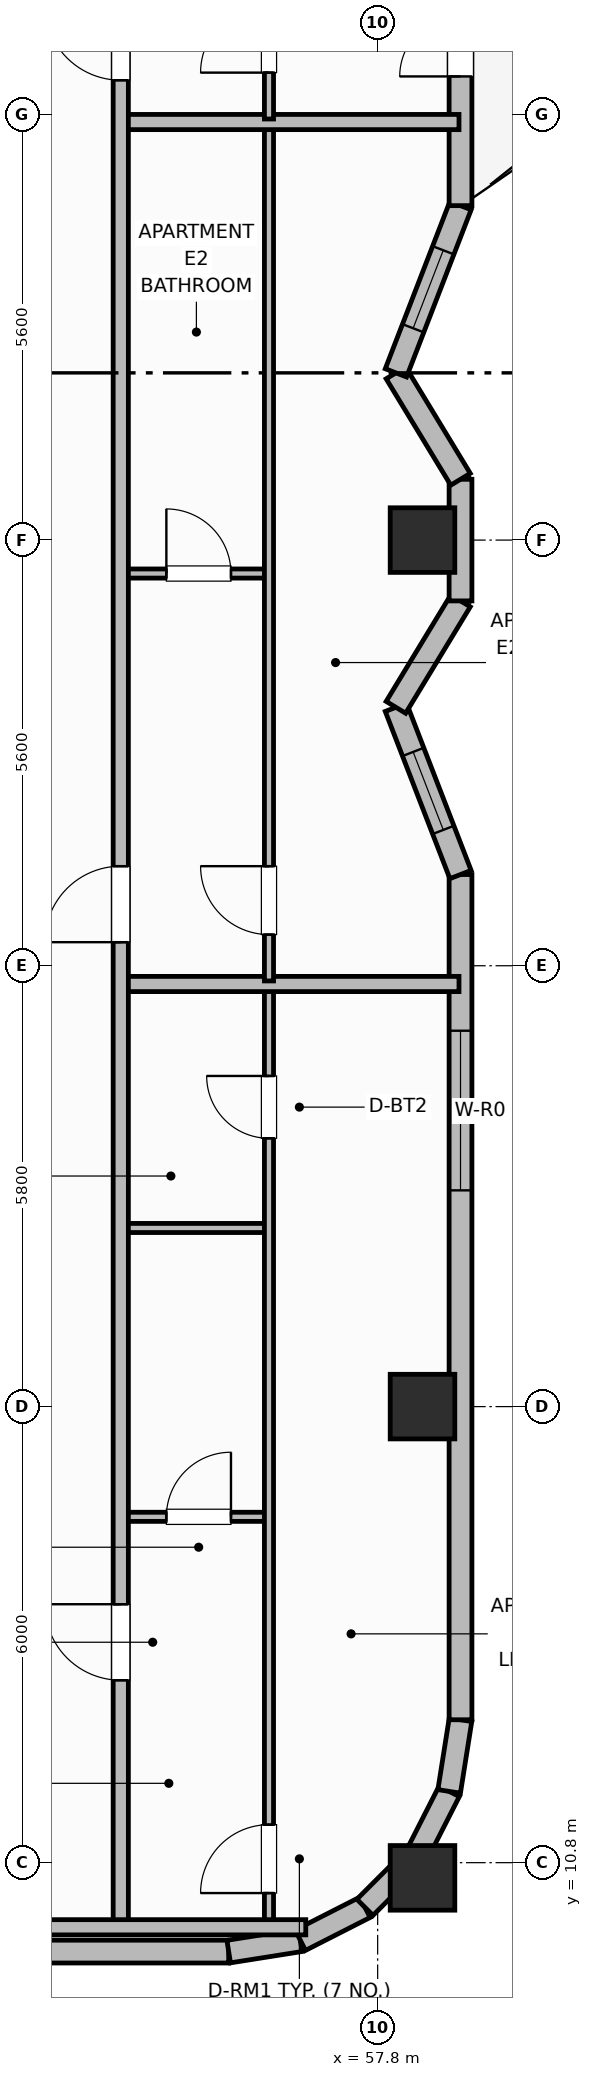
"""IFC4 building model, lengths in metres.
Left out: names, types, materials, properties, quantities, classifications, styles, units other than length and angle.
Written with IfcOpenShell. Run it as: python <this file> out.ifc"""

import sys

from ifc_helpers import new_model, si_unit, direction, frame, frame_2d, origin, origin_2d, place, context, subcontext, project, spatial, rectangle, extrude, element, fill, save


model = new_model("IFC4")
c1 = context("Model", 3, precision=1e-05, world=origin(), true_north=direction((0.0, 1.0)))
c2 = subcontext(c1, "Body", "Model", "MODEL_VIEW")
j1 = project(units=[si_unit("LENGTHUNIT", "METRE"), si_unit("PLANEANGLEUNIT", "RADIAN")], contexts=[c1])
p1 = place(None, origin())
s1 = spatial("IfcSite", under=j1, at=p1, CompositionType="ELEMENT")
p2 = place(p1, origin())
s2 = spatial("IfcBuilding", under=s1, at=p2, CompositionType="ELEMENT")
p3 = place(p2, frame((0.0, 0.0, 233.2)))
s3 = spatial("IfcBuildingStorey", under=s2, at=p3, CompositionType="ELEMENT", Elevation=233.2)
for number, where, z_axis, x_axis in (
    (1, (58.39, 10.6, 0.0), (0.0, 0.0, 1.0), (1.0, 0.0, 0.0)),
    (2, (58.39, 16.8, 0.0), (0.0, 0.0, 1.0), (1.0, 0.0, 0.0)),
    (3, (58.39, 28.2, 0.0), (0.0, 0.0, 1.0), (1.0, 0.0, 0.0)),
):
    element("IfcColumn", number, at=place(p3, frame(where, z_axis=z_axis, x_axis=x_axis)), inside=s3, PredefinedType="COLUMN", context=c2, shape_type="SweptSolid", body=[
        extrude(rectangle(XDim=0.85, YDim=0.85, at=origin_2d()), origin(), (0.0, 0.0, 1.0), 3.7),
    ])
p4 = place(p3, frame((22.56, 9.63, 0.0), z_axis=(0.0, 0.0, 1.0), x_axis=(1.0, 0.0, 0.0)))
e4 = element("IfcWall", 4, at=p4, inside=s3, PredefinedType="SOLIDWALL", context=c2, shape_type="SweptSolid", body=[
    extrude(rectangle(XDim=33.28, YDim=0.3, at=frame_2d((16.64, 0.0))), origin(), (0.0, 0.0, 1.0), 2.73),
])
p5 = place(p4, frame((4.461, 0.0, 0.95)))
e5 = element("IfcOpeningElement", 5, at=p5, cuts=e4, PredefinedType="OPENING", context=c2, shape_type="SweptSolid", body=[
    extrude(rectangle(XDim=1.1, YDim=1.65, at=frame_2d((0.55, 0.825))), frame((0.0, 0.16, 0.0), z_axis=(0.0, -1.0, 0.0), x_axis=(1.0, 0.0, 0.0)), (0.0, 0.0, 1.0), 0.32),
])
p6 = place(p4, frame((7.368, 0.0, 0.95)))
e6 = element("IfcOpeningElement", 6, at=p6, cuts=e4, PredefinedType="OPENING", context=c2, shape_type="SweptSolid", body=[
    extrude(rectangle(XDim=1.1, YDim=1.65, at=frame_2d((0.55, 0.825))), frame((0.0, 0.16, 0.0), z_axis=(0.0, -1.0, 0.0), x_axis=(1.0, 0.0, 0.0)), (0.0, 0.0, 1.0), 0.32),
])
p7 = place(p4, frame((10.275, 0.0, 0.95)))
e7 = element("IfcOpeningElement", 7, at=p7, cuts=e4, PredefinedType="OPENING", context=c2, shape_type="SweptSolid", body=[
    extrude(rectangle(XDim=1.1, YDim=1.65, at=frame_2d((0.55, 0.825))), frame((0.0, 0.16, 0.0), z_axis=(0.0, -1.0, 0.0), x_axis=(1.0, 0.0, 0.0)), (0.0, 0.0, 1.0), 0.32),
])
p8 = place(p4, frame((13.883, 0.0, 0.95)))
e8 = element("IfcOpeningElement", 8, at=p8, cuts=e4, PredefinedType="OPENING", context=c2, shape_type="SweptSolid", body=[
    extrude(rectangle(XDim=1.1, YDim=1.65, at=frame_2d((0.55, 0.825))), frame((0.0, 0.16, 0.0), z_axis=(0.0, -1.0, 0.0), x_axis=(1.0, 0.0, 0.0)), (0.0, 0.0, 1.0), 0.32),
])
p9 = place(p4, frame((16.09, 0.0, 0.95)))
e9 = element("IfcOpeningElement", 9, at=p9, cuts=e4, PredefinedType="OPENING", context=c2, shape_type="SweptSolid", body=[
    extrude(rectangle(XDim=1.1, YDim=1.65, at=frame_2d((0.55, 0.825))), frame((0.0, 0.16, 0.0), z_axis=(0.0, -1.0, 0.0), x_axis=(1.0, 0.0, 0.0)), (0.0, 0.0, 1.0), 0.32),
])
p10 = place(p4, frame((18.297, 0.0, 0.95)))
e10 = element("IfcOpeningElement", 10, at=p10, cuts=e4, PredefinedType="OPENING", context=c2, shape_type="SweptSolid", body=[
    extrude(rectangle(XDim=1.1, YDim=1.65, at=frame_2d((0.55, 0.825))), frame((0.0, 0.16, 0.0), z_axis=(0.0, -1.0, 0.0), x_axis=(1.0, 0.0, 0.0)), (0.0, 0.0, 1.0), 0.32),
])
p11 = place(p4, frame((21.905, 0.0, 0.95)))
e11 = element("IfcOpeningElement", 11, at=p11, cuts=e4, PredefinedType="OPENING", context=c2, shape_type="SweptSolid", body=[
    extrude(rectangle(XDim=1.1, YDim=1.65, at=frame_2d((0.55, 0.825))), frame((0.0, 0.16, 0.0), z_axis=(0.0, -1.0, 0.0), x_axis=(1.0, 0.0, 0.0)), (0.0, 0.0, 1.0), 0.32),
])
p12 = place(p4, frame((24.812, 0.0, 0.95)))
e12 = element("IfcOpeningElement", 12, at=p12, cuts=e4, PredefinedType="OPENING", context=c2, shape_type="SweptSolid", body=[
    extrude(rectangle(XDim=1.1, YDim=1.65, at=frame_2d((0.55, 0.825))), frame((0.0, 0.16, 0.0), z_axis=(0.0, -1.0, 0.0), x_axis=(1.0, 0.0, 0.0)), (0.0, 0.0, 1.0), 0.32),
])
p13 = place(p4, frame((27.719, 0.0, 0.95)))
e13 = element("IfcOpeningElement", 13, at=p13, cuts=e4, PredefinedType="OPENING", context=c2, shape_type="SweptSolid", body=[
    extrude(rectangle(XDim=1.1, YDim=1.65, at=frame_2d((0.55, 0.825))), frame((0.0, 0.16, 0.0), z_axis=(0.0, -1.0, 0.0), x_axis=(1.0, 0.0, 0.0)), (0.0, 0.0, 1.0), 0.32),
])
p14 = place(p3, frame((55.84, 9.63, 0.0), z_axis=(0.0, 0.0, 1.0), x_axis=(0.987663181641, 0.156593229835, 0.0)))
e14 = element("IfcWall", 14, at=p14, inside=s3, PredefinedType="SOLIDWALL", context=c2, shape_type="SweptSolid", body=[
    extrude(rectangle(XDim=0.954, YDim=0.3, at=frame_2d((0.477, 0.0))), origin(), (0.0, 0.0, 1.0), 2.73),
])
for number, where, z_axis, x_axis in (
    (15, (56.782, 9.779, 0.0), (0.0, 0.0, 1.0), (0.891, 0.454, 0.0)),
    (16, (57.633, 10.212, 0.0), (0.0, 0.0, 1.0), (0.707, 0.707, 0.0)),
    (17, (58.308, 10.887, 0.0), (0.0, 0.0, 1.0), (0.454, 0.891, 0.0)),
):
    element("IfcWall", number, at=place(p3, frame(where, z_axis=z_axis, x_axis=x_axis)), inside=s3, PredefinedType="SOLIDWALL", context=c2, shape_type="SweptSolid", body=[
        extrude(rectangle(XDim=0.954, YDim=0.3, at=frame_2d((0.477, 0.0))), origin(), (0.0, 0.0, 1.0), 2.73),
    ])
p15 = place(p3, frame((58.741, 11.738, 0.0), z_axis=(0.0, 0.0, 1.0), x_axis=(0.156343617883, 0.987702725088, 0.0)))
e18 = element("IfcWall", 18, at=p15, inside=s3, PredefinedType="SOLIDWALL", context=c2, shape_type="SweptSolid", body=[
    extrude(rectangle(XDim=0.954, YDim=0.3, at=frame_2d((0.477, 0.0))), origin(), (0.0, 0.0, 1.0), 2.73),
])
p16 = place(p3, frame((58.89, 12.68, 0.0), z_axis=(0.0, 0.0, 1.0), x_axis=(0.0, 1.0, 0.0)))
e19 = element("IfcWall", 19, at=p16, inside=s3, PredefinedType="SOLIDWALL", context=c2, shape_type="SweptSolid", body=[
    extrude(rectangle(XDim=11.12, YDim=0.3, at=frame_2d((5.56, 0.0))), origin(), (0.0, 0.0, 1.0), 2.73),
])
p17 = place(p16, frame((6.965, 0.0, 0.71)))
e20 = element("IfcOpeningElement", 20, at=p17, cuts=e19, PredefinedType="OPENING", context=c2, shape_type="SweptSolid", body=[
    extrude(rectangle(XDim=2.1, YDim=1.9, at=frame_2d((1.05, 0.95))), frame((0.0, 0.16, 0.0), z_axis=(0.0, -1.0, 0.0), x_axis=(1.0, 0.0, 0.0)), (0.0, 0.0, 1.0), 0.32),
])
p18 = place(p3, frame((58.89, 23.8, 0.0), z_axis=(0.0, 0.0, 1.0), x_axis=(-0.360352194711, 0.932816324775, 0.0)))
e21 = element("IfcWall", 21, at=p18, inside=s3, PredefinedType="SOLIDWALL", context=c2, shape_type="SweptSolid", body=[
    extrude(rectangle(XDim=2.358, YDim=0.3, at=frame_2d((1.179, 0.0))), origin(), (0.0, 0.0, 1.0), 2.73),
])
p19 = place(p18, frame((0.629, 0.0, 0.92)))
e22 = element("IfcOpeningElement", 22, at=p19, cuts=e21, PredefinedType="OPENING", context=c2, shape_type="SweptSolid", body=[
    extrude(rectangle(XDim=1.1, YDim=1.65, at=frame_2d((0.55, 0.825))), frame((0.0, 0.16, 0.0), z_axis=(0.0, -1.0, 0.0), x_axis=(1.0, 0.0, 0.0)), (0.0, 0.0, 1.0), 0.32),
])
p20 = place(p3, frame((58.04, 26.0, 0.0), z_axis=(0.0, 0.0, 1.0), x_axis=(0.518939231806, 0.854811133346, 0.0)))
e23 = element("IfcWall", 23, at=p20, inside=s3, PredefinedType="SOLIDWALL", context=c2, shape_type="SweptSolid", body=[
    extrude(rectangle(XDim=1.638, YDim=0.3, at=frame_2d((0.819, 0.0))), origin(), (0.0, 0.0, 1.0), 2.73),
])
p21 = place(p3, frame((58.89, 27.4, 0.0), z_axis=(0.0, 0.0, 1.0), x_axis=(0.0, 1.0, 0.0)))
e24 = element("IfcWall", 24, at=p21, inside=s3, PredefinedType="SOLIDWALL", context=c2, shape_type="SweptSolid", body=[
    extrude(rectangle(XDim=1.6, YDim=0.3, at=frame_2d((0.8, 0.0))), origin(), (0.0, 0.0, 1.0), 2.73),
])
p22 = place(p3, frame((58.89, 29.0, 0.0), z_axis=(0.0, 0.0, 1.0), x_axis=(-0.518939231806, 0.854811133346, 0.0)))
e25 = element("IfcWall", 25, at=p22, inside=s3, PredefinedType="SOLIDWALL", context=c2, shape_type="SweptSolid", body=[
    extrude(rectangle(XDim=1.638, YDim=0.3, at=frame_2d((0.819, 0.0))), origin(), (0.0, 0.0, 1.0), 2.73),
])
p23 = place(p3, frame((58.04, 30.4, 0.0), z_axis=(0.0, 0.0, 1.0), x_axis=(0.360317400447, 0.932829765249, 0.0)))
e26 = element("IfcWall", 26, at=p23, inside=s3, PredefinedType="SOLIDWALL", context=c2, shape_type="SweptSolid", body=[
    extrude(rectangle(XDim=2.359, YDim=0.3, at=frame_2d((1.179, 0.0))), origin(), (0.0, 0.0, 1.0), 2.73),
])
p24 = place(p23, frame((0.629, 0.0, 0.92)))
e27 = element("IfcOpeningElement", 27, at=p24, cuts=e26, PredefinedType="OPENING", context=c2, shape_type="SweptSolid", body=[
    extrude(rectangle(XDim=1.1, YDim=1.65, at=frame_2d((0.55, 0.825))), frame((0.0, 0.16, 0.0), z_axis=(0.0, -1.0, 0.0), x_axis=(1.0, 0.0, 0.0)), (0.0, 0.0, 1.0), 0.32),
])
p25 = place(p3, frame((58.89, 32.6, 0.0), z_axis=(0.0, 0.0, 1.0), x_axis=(0.0, 1.0, 0.0)))
e28 = element("IfcWall", 28, at=p25, inside=s3, PredefinedType="SOLIDWALL", context=c2, shape_type="SweptSolid", body=[
    extrude(rectangle(XDim=11.12, YDim=0.3, at=frame_2d((5.56, 0.0))), origin(), (0.0, 0.0, 1.0), 2.73),
])
p26 = place(p25, frame((1.7, 0.0, 0.0)))
e29 = element("IfcOpeningElement", 29, at=p26, cuts=e28, PredefinedType="OPENING", context=c2, shape_type="SweptSolid", body=[
    extrude(rectangle(XDim=1.6, YDim=2.1, at=frame_2d((0.8, 1.05))), frame((0.0, 0.16, 0.0), z_axis=(0.0, -1.0, 0.0), x_axis=(1.0, 0.0, 0.0)), (0.0, 0.0, 1.0), 0.32),
])
p27 = place(p3, frame((54.42, 15.35, 0.0), z_axis=(0.0, 0.0, 1.0), x_axis=(1.0, 0.0, 0.0)))
e30 = element("IfcWall", 30, at=p27, inside=s3, PredefinedType="PARTITIONING", context=c2, shape_type="SweptSolid", body=[
    extrude(rectangle(XDim=1.95, YDim=0.12, at=frame_2d((0.975, 0.0))), origin(), (0.0, 0.0, 1.0), 2.56),
])
p28 = place(p27, frame((0.6, 0.0, 0.0)))
e31 = element("IfcOpeningElement", 31, at=p28, cuts=e30, PredefinedType="OPENING", context=c2, shape_type="SweptSolid", body=[
    extrude(rectangle(XDim=0.85, YDim=2.1, at=frame_2d((0.425, 1.05))), frame((0.0, 0.07, 0.0), z_axis=(0.0, -1.0, 0.0), x_axis=(1.0, 0.0, 0.0)), (0.0, 0.0, 1.0), 0.14),
])
p29 = place(p3, frame((54.42, 19.15, 0.0), z_axis=(0.0, 0.0, 1.0), x_axis=(1.0, 0.0, 0.0)))
e32 = element("IfcWall", 32, at=p29, inside=s3, PredefinedType="PARTITIONING", context=c2, shape_type="SweptSolid", body=[
    extrude(rectangle(XDim=1.95, YDim=0.12, at=frame_2d((0.975, 0.0))), origin(), (0.0, 0.0, 1.0), 2.56),
])
p30 = place(p3, frame((56.37, 9.99, 0.0), z_axis=(0.0, 0.0, 1.0), x_axis=(0.0, 1.0, 0.0)))
e33 = element("IfcWall", 33, at=p30, inside=s3, PredefinedType="PARTITIONING", context=c2, shape_type="SweptSolid", body=[
    extrude(rectangle(XDim=12.33, YDim=0.12, at=frame_2d((6.165, 0.0))), origin(), (0.0, 0.0, 1.0), 2.56),
])
p31 = place(p30, frame((0.41, 0.0, 0.0)))
e34 = element("IfcOpeningElement", 34, at=p31, cuts=e33, PredefinedType="OPENING", context=c2, shape_type="SweptSolid", body=[
    extrude(rectangle(XDim=0.9, YDim=2.1, at=frame_2d((0.45, 1.05))), frame((0.0, 0.07, 0.0), z_axis=(0.0, -1.0, 0.0), x_axis=(1.0, 0.0, 0.0)), (0.0, 0.0, 1.0), 0.14),
])
p32 = place(p30, frame((10.34, 0.0, 0.0)))
e35 = element("IfcOpeningElement", 35, at=p32, cuts=e33, PredefinedType="OPENING", context=c2, shape_type="SweptSolid", body=[
    extrude(rectangle(XDim=0.82, YDim=2.08, at=frame_2d((0.41, 1.04))), frame((0.0, 0.07, 0.0), z_axis=(0.0, -1.0, 0.0), x_axis=(1.0, 0.0, 0.0)), (0.0, 0.0, 1.0), 0.14),
])
p33 = place(p3, frame((54.42, 22.36, 0.0), z_axis=(0.0, 0.0, 1.0), x_axis=(1.0, 0.0, 0.0)))
e36 = element("IfcWall", 36, at=p33, inside=s3, PredefinedType="PARTITIONING", context=c2, shape_type="SweptSolid", body=[
    extrude(rectangle(XDim=4.45, YDim=0.2, at=frame_2d((2.225, 0.0))), origin(), (0.0, 0.0, 1.0), 2.56),
])
p34 = place(p3, frame((54.42, 27.76, 0.0), z_axis=(0.0, 0.0, 1.0), x_axis=(1.0, 0.0, 0.0)))
e37 = element("IfcWall", 37, at=p34, inside=s3, PredefinedType="PARTITIONING", context=c2, shape_type="SweptSolid", body=[
    extrude(rectangle(XDim=1.95, YDim=0.12, at=frame_2d((0.975, 0.0))), origin(), (0.0, 0.0, 1.0), 2.56),
])
p35 = place(p34, frame((0.6, 0.0, 0.0)))
e38 = element("IfcOpeningElement", 38, at=p35, cuts=e37, PredefinedType="OPENING", context=c2, shape_type="SweptSolid", body=[
    extrude(rectangle(XDim=0.85, YDim=2.1, at=frame_2d((0.425, 1.05))), frame((0.0, 0.07, 0.0), z_axis=(0.0, -1.0, 0.0), x_axis=(1.0, 0.0, 0.0)), (0.0, 0.0, 1.0), 0.14),
])
p36 = place(p3, frame((56.37, 22.4, 0.0), z_axis=(0.0, 0.0, 1.0), x_axis=(0.0, 1.0, 0.0)))
e39 = element("IfcWall", 39, at=p36, inside=s3, PredefinedType="PARTITIONING", context=c2, shape_type="SweptSolid", body=[
    extrude(rectangle(XDim=11.26, YDim=0.12, at=frame_2d((5.63, 0.0))), origin(), (0.0, 0.0, 1.0), 2.56),
])
p37 = place(p36, frame((0.61, 0.0, 0.0)))
e40 = element("IfcOpeningElement", 40, at=p37, cuts=e39, PredefinedType="OPENING", context=c2, shape_type="SweptSolid", body=[
    extrude(rectangle(XDim=0.9, YDim=2.1, at=frame_2d((0.45, 1.05))), frame((0.0, 0.07, 0.0), z_axis=(0.0, -1.0, 0.0), x_axis=(1.0, 0.0, 0.0)), (0.0, 0.0, 1.0), 0.14),
])
p38 = place(p3, frame((54.42, 33.7, 0.0), z_axis=(0.0, 0.0, 1.0), x_axis=(1.0, 0.0, 0.0)))
e41 = element("IfcWall", 41, at=p38, inside=s3, PredefinedType="PARTITIONING", context=c2, shape_type="SweptSolid", body=[
    extrude(rectangle(XDim=4.45, YDim=0.2, at=frame_2d((2.225, 0.0))), origin(), (0.0, 0.0, 1.0), 2.56),
])
p39 = place(p3, frame((56.37, 33.74, 0.0), z_axis=(0.0, 0.0, 1.0), x_axis=(0.0, 1.0, 0.0)))
e42 = element("IfcWall", 42, at=p39, inside=s3, PredefinedType="PARTITIONING", context=c2, shape_type="SweptSolid", body=[
    extrude(rectangle(XDim=12.67, YDim=0.12, at=frame_2d((6.335, 0.0))), origin(), (0.0, 0.0, 1.0), 2.56),
])
p40 = place(p39, frame((0.61, 0.0, 0.0)))
e43 = element("IfcOpeningElement", 43, at=p40, cuts=e42, PredefinedType="OPENING", context=c2, shape_type="SweptSolid", body=[
    extrude(rectangle(XDim=0.9, YDim=2.1, at=frame_2d((0.45, 1.05))), frame((0.0, 0.07, 0.0), z_axis=(0.0, -1.0, 0.0), x_axis=(1.0, 0.0, 0.0)), (0.0, 0.0, 1.0), 0.14),
])
p41 = place(p39, frame((10.51, 0.0, 0.0)))
e44 = element("IfcOpeningElement", 44, at=p41, cuts=e42, PredefinedType="OPENING", context=c2, shape_type="SweptSolid", body=[
    extrude(rectangle(XDim=0.82, YDim=2.08, at=frame_2d((0.41, 1.04))), frame((0.0, 0.07, 0.0), z_axis=(0.0, -1.0, 0.0), x_axis=(1.0, 0.0, 0.0)), (0.0, 0.0, 1.0), 0.14),
])
p42 = place(p3, frame((54.42, 9.95, 0.0), z_axis=(0.0, 0.0, 1.0), x_axis=(0.0, 1.0, 0.0)))
e45 = element("IfcWall", 45, at=p42, inside=s3, PredefinedType="PARTITIONING", context=c2, shape_type="SweptSolid", body=[
    extrude(rectangle(XDim=36.5, YDim=0.2, at=frame_2d((18.25, 0.0))), origin(), (0.0, 0.0, 1.0), 2.56),
])
p43 = place(p42, frame((3.25, 0.0, 0.0)))
e46 = element("IfcOpeningElement", 46, at=p43, cuts=e45, PredefinedType="OPENING", context=c2, shape_type="SweptSolid", body=[
    extrude(rectangle(XDim=1.0, YDim=2.15, at=frame_2d((0.5, 1.075))), frame((0.0, 0.11, 0.0), z_axis=(0.0, -1.0, 0.0), x_axis=(1.0, 0.0, 0.0)), (0.0, 0.0, 1.0), 0.22),
])
p44 = place(p42, frame((12.96, 0.0, 0.0)))
e47 = element("IfcOpeningElement", 47, at=p44, cuts=e45, PredefinedType="OPENING", context=c2, shape_type="SweptSolid", body=[
    extrude(rectangle(XDim=1.0, YDim=2.15, at=frame_2d((0.5, 1.075))), frame((0.0, 0.11, 0.0), z_axis=(0.0, -1.0, 0.0), x_axis=(1.0, 0.0, 0.0)), (0.0, 0.0, 1.0), 0.22),
])
p45 = place(p42, frame((24.3, 0.0, 0.0)))
e48 = element("IfcOpeningElement", 48, at=p45, cuts=e45, PredefinedType="OPENING", context=c2, shape_type="SweptSolid", body=[
    extrude(rectangle(XDim=1.0, YDim=2.15, at=frame_2d((0.5, 1.075))), frame((0.0, 0.11, 0.0), z_axis=(0.0, -1.0, 0.0), x_axis=(1.0, 0.0, 0.0)), (0.0, 0.0, 1.0), 0.22),
])
p46 = place(p3, frame((53.1, 9.95, 0.0), z_axis=(0.0, 0.0, 1.0), x_axis=(1.0, 0.0, 0.0)))
e49 = element("IfcWall", 49, at=p46, inside=s3, PredefinedType="PARTITIONING", context=c2, shape_type="SweptSolid", body=[
    extrude(rectangle(XDim=3.754, YDim=0.2, at=frame_2d((1.877, 0.0))), origin(), (0.0, 0.0, 1.0), 2.56),
])
p47 = place(p17, origin())
e50 = element("IfcWindow", 50, at=p47, inside=s3, PartitioningType="SINGLE_PANEL", PredefinedType="WINDOW", context=c2, shape_type="SweptSolid", body=[
    extrude(rectangle(XDim=2.1, YDim=1.9, at=frame_2d((1.05, 0.95))), frame((0.0, 0.03, 0.0), z_axis=(0.0, -1.0, 0.0), x_axis=(1.0, 0.0, 0.0)), (0.0, 0.0, 1.0), 0.06),
])
fill(e20, e50)
p48 = place(p19, origin())
e51 = element("IfcWindow", 51, at=p48, inside=s3, PartitioningType="SINGLE_PANEL", PredefinedType="WINDOW", context=c2, shape_type="SweptSolid", body=[
    extrude(rectangle(XDim=1.1, YDim=1.65, at=frame_2d((0.55, 0.825))), frame((0.0, 0.03, 0.0), z_axis=(0.0, -1.0, 0.0), x_axis=(1.0, 0.0, 0.0)), (0.0, 0.0, 1.0), 0.06),
])
fill(e22, e51)
p49 = place(p24, origin())
e52 = element("IfcWindow", 52, at=p49, inside=s3, PartitioningType="SINGLE_PANEL", PredefinedType="WINDOW", context=c2, shape_type="SweptSolid", body=[
    extrude(rectangle(XDim=1.1, YDim=1.65, at=frame_2d((0.55, 0.825))), frame((0.0, 0.03, 0.0), z_axis=(0.0, -1.0, 0.0), x_axis=(1.0, 0.0, 0.0)), (0.0, 0.0, 1.0), 0.06),
])
fill(e27, e52)
p50 = place(p26, origin())
e53 = element("IfcDoor", 53, at=p50, inside=s3, OperationType="DOUBLE_DOOR_SINGLE_SWING", PredefinedType="DOOR", context=c2, shape_type="SweptSolid", body=[
    extrude(rectangle(XDim=1.6, YDim=2.1, at=frame_2d((0.8, 1.05))), frame((0.0, 0.025, 0.0), z_axis=(0.0, -1.0, 0.0), x_axis=(1.0, 0.0, 0.0)), (0.0, 0.0, 1.0), 0.05),
])
fill(e29, e53)
p51 = place(p28, origin())
e54 = element("IfcDoor", 54, at=p51, inside=s3, OperationType="SINGLE_SWING_RIGHT", PredefinedType="DOOR", context=c2, shape_type="SweptSolid", body=[
    extrude(rectangle(XDim=0.85, YDim=2.1, at=frame_2d((0.425, 1.05))), frame((0.0, 0.025, 0.0), z_axis=(0.0, -1.0, 0.0), x_axis=(1.0, 0.0, 0.0)), (0.0, 0.0, 1.0), 0.05),
])
fill(e31, e54)
p52 = place(p31, origin())
e55 = element("IfcDoor", 55, at=p52, inside=s3, OperationType="SINGLE_SWING_LEFT", PredefinedType="DOOR", context=c2, shape_type="SweptSolid", body=[
    extrude(rectangle(XDim=0.9, YDim=2.1, at=frame_2d((0.45, 1.05))), frame((0.0, 0.025, 0.0), z_axis=(0.0, -1.0, 0.0), x_axis=(1.0, 0.0, 0.0)), (0.0, 0.0, 1.0), 0.05),
])
fill(e34, e55)
p53 = place(p32, origin())
e56 = element("IfcDoor", 56, at=p53, inside=s3, OperationType="SINGLE_SWING_RIGHT", PredefinedType="DOOR", context=c2, shape_type="SweptSolid", body=[
    extrude(rectangle(XDim=0.82, YDim=2.08, at=frame_2d((0.41, 1.04))), frame((0.0, 0.025, 0.0), z_axis=(0.0, -1.0, 0.0), x_axis=(1.0, 0.0, 0.0)), (0.0, 0.0, 1.0), 0.05),
])
fill(e35, e56)
p54 = place(p35, origin())
e57 = element("IfcDoor", 57, at=p54, inside=s3, OperationType="SINGLE_SWING_LEFT", PredefinedType="DOOR", context=c2, shape_type="SweptSolid", body=[
    extrude(rectangle(XDim=0.85, YDim=2.1, at=frame_2d((0.425, 1.05))), frame((0.0, 0.025, 0.0), z_axis=(0.0, -1.0, 0.0), x_axis=(1.0, 0.0, 0.0)), (0.0, 0.0, 1.0), 0.05),
])
fill(e38, e57)
p55 = place(p37, origin())
e58 = element("IfcDoor", 58, at=p55, inside=s3, OperationType="SINGLE_SWING_RIGHT", PredefinedType="DOOR", context=c2, shape_type="SweptSolid", body=[
    extrude(rectangle(XDim=0.9, YDim=2.1, at=frame_2d((0.45, 1.05))), frame((0.0, 0.025, 0.0), z_axis=(0.0, -1.0, 0.0), x_axis=(1.0, 0.0, 0.0)), (0.0, 0.0, 1.0), 0.05),
])
fill(e40, e58)
p56 = place(p40, origin())
e59 = element("IfcDoor", 59, at=p56, inside=s3, OperationType="SINGLE_SWING_LEFT", PredefinedType="DOOR", context=c2, shape_type="SweptSolid", body=[
    extrude(rectangle(XDim=0.9, YDim=2.1, at=frame_2d((0.45, 1.05))), frame((0.0, 0.025, 0.0), z_axis=(0.0, -1.0, 0.0), x_axis=(1.0, 0.0, 0.0)), (0.0, 0.0, 1.0), 0.05),
])
fill(e43, e59)
p57 = place(p43, origin())
e60 = element("IfcDoor", 60, at=p57, inside=s3, OperationType="SINGLE_SWING_RIGHT", PredefinedType="DOOR", context=c2, shape_type="SweptSolid", body=[
    extrude(rectangle(XDim=1.0, YDim=2.15, at=frame_2d((0.5, 1.075))), frame((0.0, 0.025, 0.0), z_axis=(0.0, -1.0, 0.0), x_axis=(1.0, 0.0, 0.0)), (0.0, 0.0, 1.0), 0.05),
])
fill(e46, e60)
p58 = place(p44, origin())
e61 = element("IfcDoor", 61, at=p58, inside=s3, OperationType="SINGLE_SWING_LEFT", PredefinedType="DOOR", context=c2, shape_type="SweptSolid", body=[
    extrude(rectangle(XDim=1.0, YDim=2.15, at=frame_2d((0.5, 1.075))), frame((0.0, 0.025, 0.0), z_axis=(0.0, -1.0, 0.0), x_axis=(1.0, 0.0, 0.0)), (0.0, 0.0, 1.0), 0.05),
])
fill(e47, e61)
p59 = place(p45, origin())
e62 = element("IfcDoor", 62, at=p59, inside=s3, OperationType="SINGLE_SWING_RIGHT", PredefinedType="DOOR", context=c2, shape_type="SweptSolid", body=[
    extrude(rectangle(XDim=1.0, YDim=2.15, at=frame_2d((0.5, 1.075))), frame((0.0, 0.025, 0.0), z_axis=(0.0, -1.0, 0.0), x_axis=(1.0, 0.0, 0.0)), (0.0, 0.0, 1.0), 0.05),
])
fill(e48, e62)
save(model, sys.argv[1])
